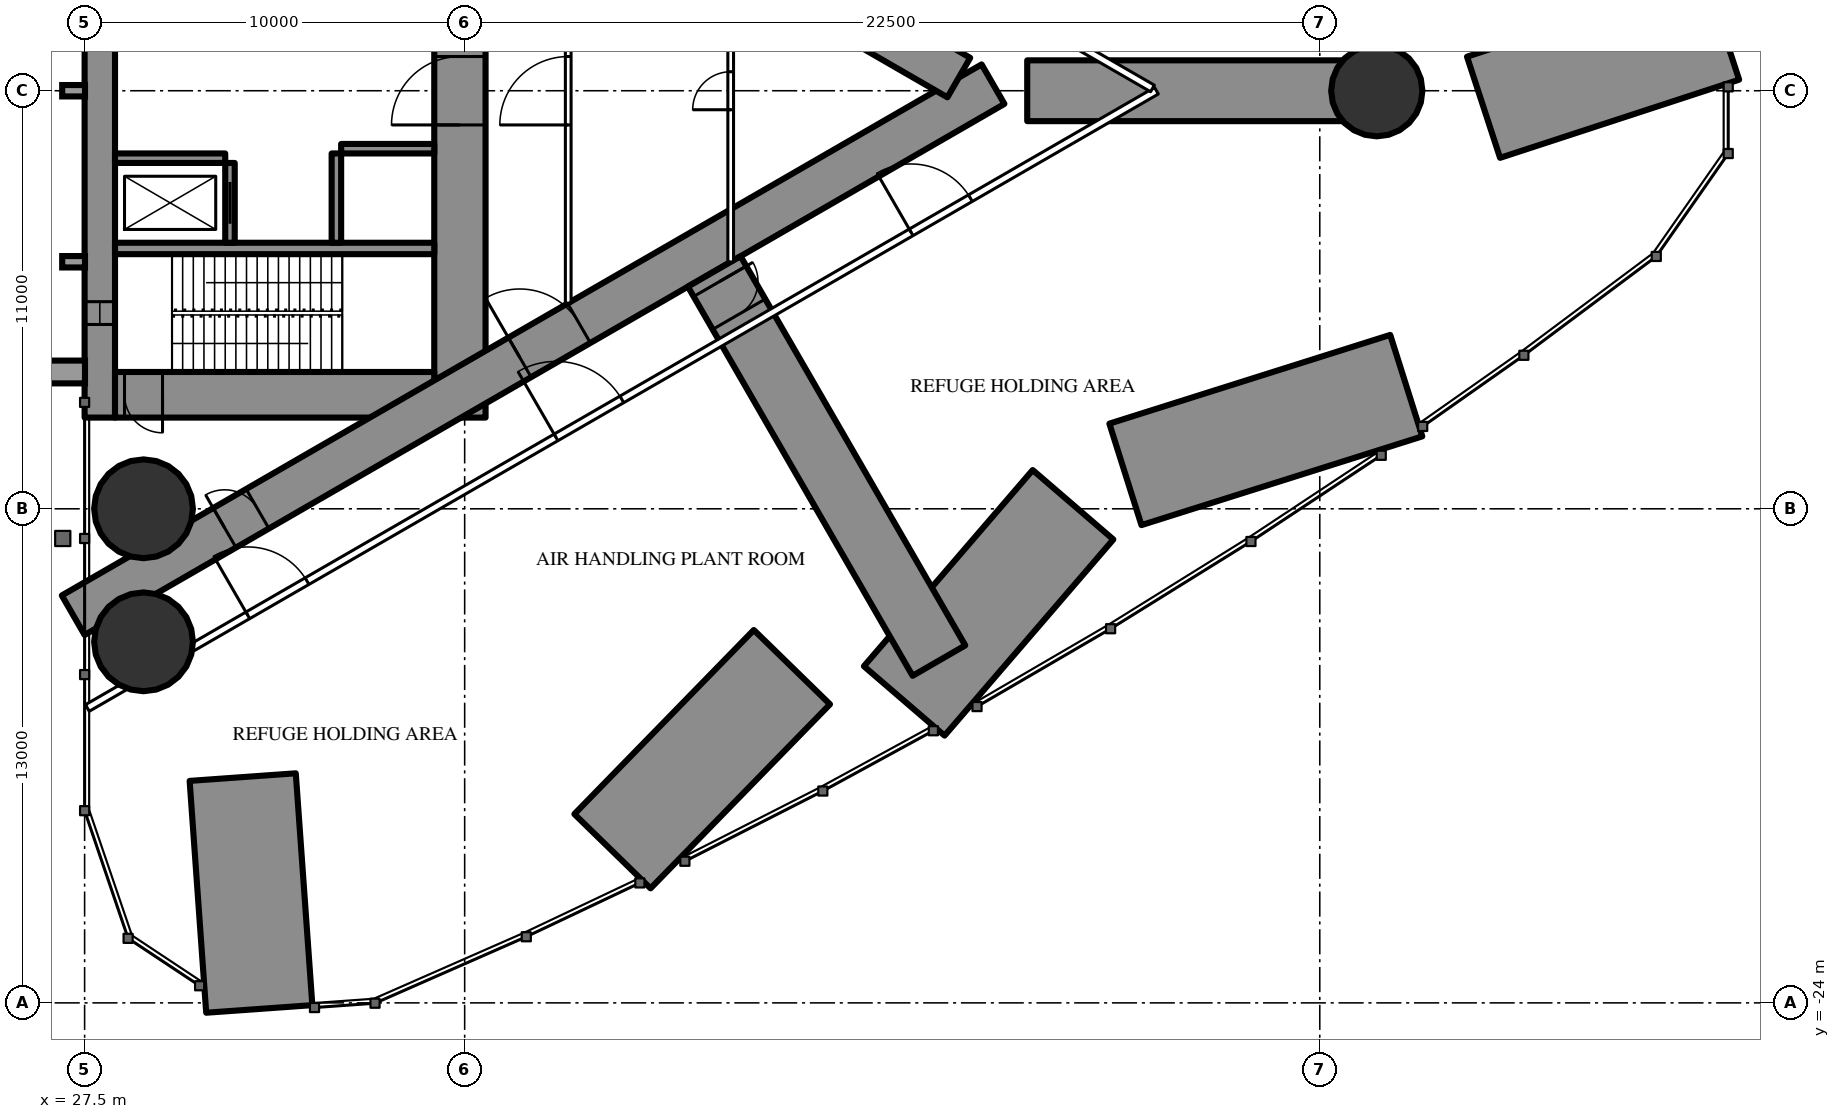
"""IFC4 building model, lengths in metres.
Left out: names, types, materials, properties, quantities, classifications, styles, units other than length and angle.
Written with IfcOpenShell. Run it as: python <this file> out.ifc"""

import sys

from ifc_helpers import new_model, si_unit, direction, frame, frame_2d, origin, origin_2d, place, context, subcontext, project, spatial, rectangle, circle, hollow_circle, extrude, element, fill, save


model = new_model("IFC4")
c1 = context("Model", 3, precision=1e-05, world=origin(), true_north=direction((0.0, 1.0)))
c2 = subcontext(c1, "Body", "Model", "MODEL_VIEW")
j1 = project(units=[si_unit("LENGTHUNIT", "METRE"), si_unit("PLANEANGLEUNIT", "RADIAN")], contexts=[c1])
p1 = place(None, origin())
s1 = spatial("IfcSite", under=j1, at=p1, CompositionType="ELEMENT")
p2 = place(p1, origin())
s2 = spatial("IfcBuilding", under=s1, at=p2, CompositionType="ELEMENT")
p3 = place(p2, frame((0.0, 0.0, 146.7)))
s3 = spatial("IfcBuildingStorey", under=s2, at=p3, CompositionType="ELEMENT", Elevation=146.7)
p4 = place(p3, frame((70.6, 1.622, 0.0), z_axis=(0.0, 0.0, 1.0), x_axis=(-0.95049343947, -0.31074462429, 0.0)))
e1 = element("IfcWall", 1, at=p4, inside=s3, PredefinedType="SHEAR", context=c2, shape_type="SweptSolid", body=[
    extrude(rectangle(XDim=6.618, YDim=2.8, at=frame_2d((3.309, 0.0))), origin(), (0.0, 0.0, 1.0), 6.0),
])
p5 = place(p3, frame((32.096, -24.16, 0.0), z_axis=(0.0, 0.0, 1.0), x_axis=(-0.071255560652, 0.99745809189, 0.0)))
e2 = element("IfcWall", 2, at=p5, inside=s3, PredefinedType="SHEAR", context=c2, shape_type="SweptSolid", body=[
    extrude(rectangle(XDim=6.116, YDim=2.8, at=frame_2d((3.058, 0.0))), origin(), (0.0, 0.0, 1.0), 6.0),
])
for number, where, z_axis, x_axis in (
    (3, (29.05, -11.0, 0.0), (0.0, 0.0, 1.0), (1.0, 0.0, 0.0)),
    (4, (29.05, -14.5, 0.0), (0.0, 0.0, 1.0), (1.0, 0.0, 0.0)),
):
    element("IfcColumn", number, at=place(p3, frame(where, z_axis=z_axis, x_axis=x_axis)), inside=s3, PredefinedType="COLUMN", context=c2, shape_type="SweptSolid", body=[
        extrude(hollow_circle(Radius=1.3, WallThickness=0.1, at=origin_2d()), origin(), (0.0, 0.0, 1.0), 6.0),
    ])
p6 = place(p3, frame((41.389, -20.01, 0.0), z_axis=(0.0, 0.0, 1.0), x_axis=(0.698062666637, 0.716036670463, 0.0)))
e5 = element("IfcWall", 5, at=p6, inside=s3, PredefinedType="SHEAR", context=c2, shape_type="SweptSolid", body=[
    extrude(rectangle(XDim=6.764, YDim=2.8, at=frame_2d((3.382, 0.0))), origin(), (0.0, 0.0, 1.0), 6.0),
])
p7 = place(p3, frame((49.066, -16.055, 0.0), z_axis=(0.0, 0.0, 1.0), x_axis=(0.652228022196, 0.758022827534, 0.0)))
e6 = element("IfcWall", 6, at=p7, inside=s3, PredefinedType="SHEAR", context=c2, shape_type="SweptSolid", body=[
    extrude(rectangle(XDim=6.81, YDim=2.8, at=frame_2d((3.405, 0.0))), origin(), (0.0, 0.0, 1.0), 6.0),
])
p8 = place(p3, frame((62.276, -7.76, 0.0), z_axis=(0.0, 0.0, 1.0), x_axis=(-0.953540281048, -0.30126555133, 0.0)))
e7 = element("IfcWall", 7, at=p8, inside=s3, PredefinedType="SHEAR", context=c2, shape_type="SweptSolid", body=[
    extrude(rectangle(XDim=7.75, YDim=2.8, at=frame_2d((3.875, 0.0))), origin(), (0.0, 0.0, 1.0), 6.0),
])
p9 = place(p3, frame((61.5, 0.0, 0.0), z_axis=(0.0, 0.0, 1.0), x_axis=(1.0, 0.0, 0.0)))
e8 = element("IfcColumn", 8, at=p9, inside=s3, PredefinedType="COLUMN", context=c2, shape_type="SweptSolid", body=[
    extrude(circle(Radius=1.2, at=origin_2d()), origin(), (0.0, 0.0, 1.0), 6.0),
])
p10 = place(p3, frame((27.9, -8.6, 0.0), z_axis=(0.0, 0.0, 1.0), x_axis=(0.0, 1.0, 0.0)))
e9 = element("IfcWall", 9, at=p10, inside=s3, PredefinedType="SHEAR", context=c2, shape_type="SweptSolid", body=[
    extrude(rectangle(XDim=17.2, YDim=0.8, at=frame_2d((8.6, 0.0))), origin(), (0.0, 0.0, 1.0), 6.0),
])
p11 = place(p10, frame((2.45, 0.0, 0.6)))
e10 = element("IfcOpeningElement", 10, at=p11, cuts=e9, PredefinedType="OPENING", context=c2, shape_type="SweptSolid", body=[
    extrude(rectangle(XDim=0.6, YDim=4.5, at=frame_2d((0.3, 2.25))), frame((0.0, 0.41, 0.0), z_axis=(0.0, -1.0, 0.0), x_axis=(1.0, 0.0, 0.0)), (0.0, 0.0, 1.0), 0.82),
])
p12 = place(p10, frame((14.15, 0.0, 0.6)))
e11 = element("IfcOpeningElement", 11, at=p12, cuts=e9, PredefinedType="OPENING", context=c2, shape_type="SweptSolid", body=[
    extrude(rectangle(XDim=0.6, YDim=4.5, at=frame_2d((0.3, 2.25))), frame((0.0, 0.41, 0.0), z_axis=(0.0, -1.0, 0.0), x_axis=(1.0, 0.0, 0.0)), (0.0, 0.0, 1.0), 0.82),
])
p13 = place(p3, frame((37.375, -8.6, 0.0), z_axis=(0.0, 0.0, 1.0), x_axis=(0.0, 1.0, 0.0)))
e12 = element("IfcWall", 12, at=p13, inside=s3, PredefinedType="SHEAR", context=c2, shape_type="SweptSolid", body=[
    extrude(rectangle(XDim=17.2, YDim=1.35, at=frame_2d((8.6, 0.0))), origin(), (0.0, 0.0, 1.0), 6.0),
])
p14 = place(p13, frame((7.7, 0.0, 0.0)))
e13 = element("IfcOpeningElement", 13, at=p14, cuts=e12, PredefinedType="OPENING", context=c2, shape_type="SweptSolid", body=[
    extrude(rectangle(XDim=1.8, YDim=2.2, at=frame_2d((0.9, 1.1))), frame((0.0, 0.685, 0.0), z_axis=(0.0, -1.0, 0.0), x_axis=(1.0, 0.0, 0.0)), (0.0, 0.0, 1.0), 1.37),
])
p15 = place(p3, frame((28.3, -8.0, 0.0), z_axis=(0.0, 0.0, 1.0), x_axis=(1.0, 0.0, 0.0)))
e14 = element("IfcWall", 14, at=p15, inside=s3, PredefinedType="SHEAR", context=c2, shape_type="SweptSolid", body=[
    extrude(rectangle(XDim=8.4, YDim=1.2, at=frame_2d((4.2, 0.0))), origin(), (0.0, 0.0, 1.0), 6.0),
])
p16 = place(p15, frame((0.25, 0.0, 0.0)))
e15 = element("IfcOpeningElement", 15, at=p16, cuts=e14, PredefinedType="OPENING", context=c2, shape_type="SweptSolid", body=[
    extrude(rectangle(XDim=1.0, YDim=2.2, at=frame_2d((0.5, 1.1))), frame((0.0, 0.61, 0.0), z_axis=(0.0, -1.0, 0.0), x_axis=(1.0, 0.0, 0.0)), (0.0, 0.0, 1.0), 1.22),
])
p17 = place(p3, frame((28.3, -4.15, 0.0), z_axis=(0.0, 0.0, 1.0), x_axis=(1.0, 0.0, 0.0)))
e16 = element("IfcWall", 16, at=p17, inside=s3, PredefinedType="SHEAR", context=c2, shape_type="SweptSolid", body=[
    extrude(rectangle(XDim=8.4, YDim=0.3, at=frame_2d((4.2, 0.0))), origin(), (0.0, 0.0, 1.0), 6.0),
])
p18 = place(p3, frame((31.325, -4.0, 0.0), z_axis=(0.0, 0.0, 1.0), x_axis=(0.0, 1.0, 0.0)))
e17 = element("IfcWall", 17, at=p18, inside=s3, PredefinedType="SHEAR", context=c2, shape_type="SweptSolid", body=[
    extrude(rectangle(XDim=2.1, YDim=0.25, at=frame_2d((1.05, 0.0))), origin(), (0.0, 0.0, 1.0), 6.0),
])
p19 = place(p18, frame((0.5, 0.0, 0.0)))
e18 = element("IfcOpeningElement", 18, at=p19, cuts=e17, PredefinedType="OPENING", context=c2, shape_type="SweptSolid", body=[
    extrude(rectangle(XDim=1.1, YDim=2.2, at=frame_2d((0.55, 1.1))), frame((0.0, 0.135, 0.0), z_axis=(0.0, -1.0, 0.0), x_axis=(1.0, 0.0, 0.0)), (0.0, 0.0, 1.0), 0.27),
])
p20 = place(p3, frame((34.125, -4.0, 0.0), z_axis=(0.0, 0.0, 1.0), x_axis=(0.0, 1.0, 0.0)))
e19 = element("IfcWall", 19, at=p20, inside=s3, PredefinedType="SHEAR", context=c2, shape_type="SweptSolid", body=[
    extrude(rectangle(XDim=2.35, YDim=0.25, at=frame_2d((1.175, 0.0))), origin(), (0.0, 0.0, 1.0), 6.0),
])
p21 = place(p3, frame((28.3, -1.775, 0.0), z_axis=(0.0, 0.0, 1.0), x_axis=(1.0, 0.0, 0.0)))
e20 = element("IfcWall", 20, at=p21, inside=s3, PredefinedType="SHEAR", context=c2, shape_type="SweptSolid", body=[
    extrude(rectangle(XDim=2.9, YDim=0.25, at=frame_2d((1.45, 0.0))), origin(), (0.0, 0.0, 1.0), 6.0),
])
p22 = place(p3, frame((34.25, -1.525, 0.0), z_axis=(0.0, 0.0, 1.0), x_axis=(1.0, 0.0, 0.0)))
e21 = element("IfcWall", 21, at=p22, inside=s3, PredefinedType="SHEAR", context=c2, shape_type="SweptSolid", body=[
    extrude(rectangle(XDim=2.45, YDim=0.25, at=frame_2d((1.225, 0.0))), origin(), (0.0, 0.0, 1.0), 6.0),
])
p23 = place(p3, frame((27.2, -13.8, 0.0), z_axis=(0.0, 0.0, 1.0), x_axis=(0.866027159892, 0.499996958321, 0.0)))
e22 = element("IfcWall", 22, at=p23, inside=s3, PredefinedType="SHEAR", context=c2, shape_type="SweptSolid", body=[
    extrude(rectangle(XDim=27.947, YDim=1.2, at=frame_2d((13.973, 0.0))), origin(), (0.0, 0.0, 1.0), 6.0),
])
p24 = place(p23, frame((4.6, 0.0, 0.0)))
e23 = element("IfcOpeningElement", 23, at=p24, cuts=e22, PredefinedType="OPENING", context=c2, shape_type="SweptSolid", body=[
    extrude(rectangle(XDim=1.0, YDim=2.2, at=frame_2d((0.5, 1.1))), frame((0.0, 0.61, 0.0), z_axis=(0.0, -1.0, 0.0), x_axis=(1.0, 0.0, 0.0)), (0.0, 0.0, 1.0), 1.22),
])
p25 = place(p23, frame((13.568, 0.0, 0.0)))
e24 = element("IfcOpeningElement", 24, at=p25, cuts=e22, PredefinedType="OPENING", context=c2, shape_type="SweptSolid", body=[
    extrude(rectangle(XDim=1.8, YDim=2.2, at=frame_2d((0.9, 1.1))), frame((0.0, 0.61, 0.0), z_axis=(0.0, -1.0, 0.0), x_axis=(1.0, 0.0, 0.0)), (0.0, 0.0, 1.0), 1.22),
])
p26 = place(p3, frame((27.2, 13.8, 0.0), z_axis=(0.0, 0.0, 1.0), x_axis=(0.866024515034, -0.500001539357, 0.0)))
e25 = element("IfcWall", 25, at=p26, inside=s3, PredefinedType="SHEAR", context=c2, shape_type="SweptSolid", body=[
    extrude(rectangle(XDim=26.907, YDim=1.2, at=frame_2d((13.454, 0.0))), origin(), (0.0, 0.0, 1.0), 6.0),
])
p27 = place(p26, frame((4.6, 0.0, 0.0)))
e26 = element("IfcOpeningElement", 26, at=p27, cuts=e25, PredefinedType="OPENING", context=c2, shape_type="SweptSolid", body=[
    extrude(rectangle(XDim=1.0, YDim=2.2, at=frame_2d((0.5, 1.1))), frame((0.0, 0.61, 0.0), z_axis=(0.0, -1.0, 0.0), x_axis=(1.0, 0.0, 0.0)), (0.0, 0.0, 1.0), 1.22),
])
p28 = place(p26, frame((13.568, 0.0, 0.0)))
e27 = element("IfcOpeningElement", 27, at=p28, cuts=e25, PredefinedType="OPENING", context=c2, shape_type="SweptSolid", body=[
    extrude(rectangle(XDim=1.8, YDim=2.2, at=frame_2d((0.9, 1.1))), frame((0.0, 0.61, 0.0), z_axis=(0.0, -1.0, 0.0), x_axis=(1.0, 0.0, 0.0)), (0.0, 0.0, 1.0), 1.22),
])
p29 = place(p3, frame((44.067, -4.754, 0.0), z_axis=(0.0, 0.0, 1.0), x_axis=(0.499987574995, -0.866032577246, 0.0)))
e28 = element("IfcWall", 28, at=p29, inside=s3, PredefinedType="SHEAR", context=c2, shape_type="SweptSolid", body=[
    extrude(rectangle(XDim=11.824, YDim=1.6, at=frame_2d((5.912, 0.0))), origin(), (0.0, 0.0, 1.0), 6.0),
])
p30 = place(p29, frame((0.3, 0.0, 0.0)))
e29 = element("IfcOpeningElement", 29, at=p30, cuts=e28, PredefinedType="OPENING", context=c2, shape_type="SweptSolid", body=[
    extrude(rectangle(XDim=1.0, YDim=2.2, at=frame_2d((0.5, 1.1))), frame((0.0, 0.81, 0.0), z_axis=(0.0, -1.0, 0.0), x_axis=(1.0, 0.0, 0.0)), (0.0, 0.0, 1.0), 1.62),
])
p31 = place(p3, frame((52.302, 0.0, 0.0), z_axis=(0.0, 0.0, 1.0), x_axis=(1.0, 0.0, 0.0)))
e30 = element("IfcWall", 30, at=p31, inside=s3, PredefinedType="SHEAR", context=c2, shape_type="SweptSolid", body=[
    extrude(rectangle(XDim=9.198, YDim=1.6, at=frame_2d((4.599, 0.0))), origin(), (0.0, 0.0, 1.0), 6.0),
])
p32 = place(p3, frame((27.572, -16.241, 0.0), z_axis=(0.0, 0.0, 1.0), x_axis=(0.86602499815, 0.500000702579, 0.0)))
e31 = element("IfcWall", 31, at=p32, inside=s3, PredefinedType="PARTITIONING", context=c2, shape_type="SweptSolid", body=[
    extrude(rectangle(XDim=32.482, YDim=0.2, at=frame_2d((16.241, 0.0))), origin(), (0.0, 0.0, 1.0), 5.75),
])
p33 = place(p32, frame((4.875, 0.0, 0.0)))
e32 = element("IfcOpeningElement", 32, at=p33, cuts=e31, PredefinedType="OPENING", context=c2, shape_type="SweptSolid", body=[
    extrude(rectangle(XDim=1.8, YDim=2.2, at=frame_2d((0.9, 1.1))), frame((0.0, 0.11, 0.0), z_axis=(0.0, -1.0, 0.0), x_axis=(1.0, 0.0, 0.0)), (0.0, 0.0, 1.0), 0.22),
])
p34 = place(p32, frame((14.24, 0.0, 0.0)))
e33 = element("IfcOpeningElement", 33, at=p34, cuts=e31, PredefinedType="OPENING", context=c2, shape_type="SweptSolid", body=[
    extrude(rectangle(XDim=2.0, YDim=2.4, at=frame_2d((1.0, 1.2))), frame((0.0, 0.11, 0.0), z_axis=(0.0, -1.0, 0.0), x_axis=(1.0, 0.0, 0.0)), (0.0, 0.0, 1.0), 0.22),
])
p35 = place(p32, frame((25.029, 0.0, 0.0)))
e34 = element("IfcOpeningElement", 34, at=p35, cuts=e31, PredefinedType="OPENING", context=c2, shape_type="SweptSolid", body=[
    extrude(rectangle(XDim=1.8, YDim=2.2, at=frame_2d((0.9, 1.1))), frame((0.0, 0.11, 0.0), z_axis=(0.0, -1.0, 0.0), x_axis=(1.0, 0.0, 0.0)), (0.0, 0.0, 1.0), 0.22),
])
p36 = place(p3, frame((36.834, 10.894, 0.0), z_axis=(0.0, 0.0, 1.0), x_axis=(0.866028157229, -0.499995230863, 0.0)))
e35 = element("IfcWall", 35, at=p36, inside=s3, PredefinedType="PARTITIONING", context=c2, shape_type="SweptSolid", body=[
    extrude(rectangle(XDim=21.667, YDim=0.2, at=frame_2d((10.833, 0.0))), origin(), (0.0, 0.0, 1.0), 5.75),
])
p37 = place(p36, frame((16.236, 0.0, 0.0)))
e36 = element("IfcOpeningElement", 36, at=p37, cuts=e35, PredefinedType="OPENING", context=c2, shape_type="SweptSolid", body=[
    extrude(rectangle(XDim=1.8, YDim=2.2, at=frame_2d((0.9, 1.1))), frame((0.0, 0.11, 0.0), z_axis=(0.0, -1.0, 0.0), x_axis=(1.0, 0.0, 0.0)), (0.0, 0.0, 1.0), 0.22),
])
p38 = place(p36, frame((5.796, 0.0, 0.0)))
e37 = element("IfcOpeningElement", 37, at=p38, cuts=e35, PredefinedType="OPENING", context=c2, shape_type="SweptSolid", body=[
    extrude(rectangle(XDim=1.8, YDim=2.2, at=frame_2d((0.9, 1.1))), frame((0.0, 0.11, 0.0), z_axis=(0.0, -1.0, 0.0), x_axis=(1.0, 0.0, 0.0)), (0.0, 0.0, 1.0), 0.22),
])
p39 = place(p3, frame((40.225, -5.587, 0.0), z_axis=(0.0, 0.0, 1.0), x_axis=(0.0, 1.0, 0.0)))
e38 = element("IfcWall", 38, at=p39, inside=s3, PredefinedType="PARTITIONING", context=c2, shape_type="SweptSolid", body=[
    extrude(rectangle(XDim=11.174, YDim=0.15, at=frame_2d((5.587, 0.0))), origin(), (0.0, 0.0, 1.0), 5.75),
])
p40 = place(p39, frame((4.687, 0.0, 0.0)))
e39 = element("IfcOpeningElement", 39, at=p40, cuts=e38, PredefinedType="OPENING", context=c2, shape_type="SweptSolid", body=[
    extrude(rectangle(XDim=1.8, YDim=2.2, at=frame_2d((0.9, 1.1))), frame((0.0, 0.085, 0.0), z_axis=(0.0, -1.0, 0.0), x_axis=(1.0, 0.0, 0.0)), (0.0, 0.0, 1.0), 0.17),
])
p41 = place(p3, frame((44.5, -4.505, 0.0), z_axis=(0.0, 0.0, 1.0), x_axis=(0.0, 1.0, 0.0)))
e40 = element("IfcWall", 40, at=p41, inside=s3, PredefinedType="PARTITIONING", context=c2, shape_type="SweptSolid", body=[
    extrude(rectangle(XDim=9.009, YDim=0.15, at=frame_2d((4.505, 0.0))), origin(), (0.0, 0.0, 1.0), 5.75),
])
p42 = place(p41, frame((4.005, 0.0, 0.0)))
e41 = element("IfcOpeningElement", 41, at=p42, cuts=e40, PredefinedType="OPENING", context=c2, shape_type="SweptSolid", body=[
    extrude(rectangle(XDim=1.0, YDim=2.2, at=frame_2d((0.5, 1.1))), frame((0.0, 0.085, 0.0), z_axis=(0.0, -1.0, 0.0), x_axis=(1.0, 0.0, 0.0)), (0.0, 0.0, 1.0), 0.17),
])
p43 = place(p30, origin())
e42 = element("IfcDoor", 42, at=p43, inside=s3, OperationType="SINGLE_SWING_LEFT", PredefinedType="DOOR", context=c2, shape_type="SweptSolid", body=[
    extrude(rectangle(XDim=1.0, YDim=2.2, at=frame_2d((0.5, 1.1))), frame((0.0, 0.025, 0.0), z_axis=(0.0, -1.0, 0.0), x_axis=(1.0, 0.0, 0.0)), (0.0, 0.0, 1.0), 0.05),
])
fill(e29, e42)
p44 = place(p33, origin())
e43 = element("IfcDoor", 43, at=p44, inside=s3, OperationType="DOUBLE_DOOR_SINGLE_SWING", PredefinedType="DOOR", context=c2, shape_type="SweptSolid", body=[
    extrude(rectangle(XDim=1.8, YDim=2.2, at=frame_2d((0.9, 1.1))), frame((0.0, 0.025, 0.0), z_axis=(0.0, -1.0, 0.0), x_axis=(1.0, 0.0, 0.0)), (0.0, 0.0, 1.0), 0.05),
])
fill(e32, e43)
p45 = place(p34, origin())
e44 = element("IfcDoor", 44, at=p45, inside=s3, OperationType="DOUBLE_DOOR_SINGLE_SWING", PredefinedType="DOOR", context=c2, shape_type="SweptSolid", body=[
    extrude(rectangle(XDim=2.0, YDim=2.4, at=frame_2d((1.0, 1.2))), frame((0.0, 0.025, 0.0), z_axis=(0.0, -1.0, 0.0), x_axis=(1.0, 0.0, 0.0)), (0.0, 0.0, 1.0), 0.05),
])
fill(e33, e44)
p46 = place(p35, origin())
e45 = element("IfcDoor", 45, at=p46, inside=s3, OperationType="DOUBLE_DOOR_SINGLE_SWING", PredefinedType="DOOR", context=c2, shape_type="SweptSolid", body=[
    extrude(rectangle(XDim=1.8, YDim=2.2, at=frame_2d((0.9, 1.1))), frame((0.0, 0.025, 0.0), z_axis=(0.0, -1.0, 0.0), x_axis=(1.0, 0.0, 0.0)), (0.0, 0.0, 1.0), 0.05),
])
fill(e34, e45)
p47 = place(p40, origin())
e46 = element("IfcDoor", 46, at=p47, inside=s3, OperationType="DOUBLE_DOOR_SINGLE_SWING", PredefinedType="DOOR", context=c2, shape_type="SweptSolid", body=[
    extrude(rectangle(XDim=1.8, YDim=2.2, at=frame_2d((0.9, 1.1))), frame((0.0, 0.025, 0.0), z_axis=(0.0, -1.0, 0.0), x_axis=(1.0, 0.0, 0.0)), (0.0, 0.0, 1.0), 0.05),
])
fill(e39, e46)
p48 = place(p42, origin())
e47 = element("IfcDoor", 47, at=p48, inside=s3, OperationType="SINGLE_SWING_LEFT", PredefinedType="DOOR", context=c2, shape_type="SweptSolid", body=[
    extrude(rectangle(XDim=1.0, YDim=2.2, at=frame_2d((0.5, 1.1))), frame((0.0, 0.025, 0.0), z_axis=(0.0, -1.0, 0.0), x_axis=(1.0, 0.0, 0.0)), (0.0, 0.0, 1.0), 0.05),
])
fill(e41, e47)
p49 = place(p24, origin())
e48 = element("IfcDoor", 48, at=p49, inside=s3, OperationType="SINGLE_SWING_LEFT", PredefinedType="DOOR", context=c2, shape_type="SweptSolid", body=[
    extrude(rectangle(XDim=1.0, YDim=2.2, at=frame_2d((0.5, 1.1))), frame((0.0, 0.025, 0.0), z_axis=(0.0, -1.0, 0.0), x_axis=(1.0, 0.0, 0.0)), (0.0, 0.0, 1.0), 0.05),
])
fill(e23, e48)
p50 = place(p25, origin())
e49 = element("IfcDoor", 49, at=p50, inside=s3, OperationType="DOUBLE_DOOR_SINGLE_SWING", PredefinedType="DOOR", context=c2, shape_type="SweptSolid", body=[
    extrude(rectangle(XDim=1.8, YDim=2.2, at=frame_2d((0.9, 1.1))), frame((0.0, 0.025, 0.0), z_axis=(0.0, -1.0, 0.0), x_axis=(1.0, 0.0, 0.0)), (0.0, 0.0, 1.0), 0.05),
])
fill(e24, e49)
p51 = place(p14, origin())
e50 = element("IfcDoor", 50, at=p51, inside=s3, OperationType="DOUBLE_DOOR_SINGLE_SWING", PredefinedType="DOOR", context=c2, shape_type="SweptSolid", body=[
    extrude(rectangle(XDim=1.8, YDim=2.2, at=frame_2d((0.9, 1.1))), frame((0.0, 0.025, 0.0), z_axis=(0.0, -1.0, 0.0), x_axis=(1.0, 0.0, 0.0)), (0.0, 0.0, 1.0), 0.05),
])
fill(e13, e50)
p52 = place(p16, origin())
e51 = element("IfcDoor", 51, at=p52, inside=s3, OperationType="SINGLE_SWING_RIGHT", PredefinedType="DOOR", context=c2, shape_type="SweptSolid", body=[
    extrude(rectangle(XDim=1.0, YDim=2.2, at=frame_2d((0.5, 1.1))), frame((0.0, 0.025, 0.0), z_axis=(0.0, -1.0, 0.0), x_axis=(1.0, 0.0, 0.0)), (0.0, 0.0, 1.0), 0.05),
])
fill(e15, e51)
p53 = place(p19, origin())
e52 = element("IfcDoor", 52, at=p53, inside=s3, OperationType="SLIDING_TO_LEFT", PredefinedType="USERDEFINED", context=c2, shape_type="SweptSolid", body=[
    extrude(rectangle(XDim=1.1, YDim=2.2, at=frame_2d((0.55, 1.1))), frame((0.0, 0.025, 0.0), z_axis=(0.0, -1.0, 0.0), x_axis=(1.0, 0.0, 0.0)), (0.0, 0.0, 1.0), 0.05),
])
fill(e18, e52)
p54 = place(p11, origin())
e53 = element("IfcWindow", 53, at=p54, inside=s3, PartitioningType="SINGLE_PANEL", PredefinedType="WINDOW", context=c2, shape_type="SweptSolid", body=[
    extrude(rectangle(XDim=0.6, YDim=4.5, at=frame_2d((0.3, 2.25))), frame((0.0, 0.03, 0.0), z_axis=(0.0, -1.0, 0.0), x_axis=(1.0, 0.0, 0.0)), (0.0, 0.0, 1.0), 0.06),
])
fill(e10, e53)
save(model, sys.argv[1])
